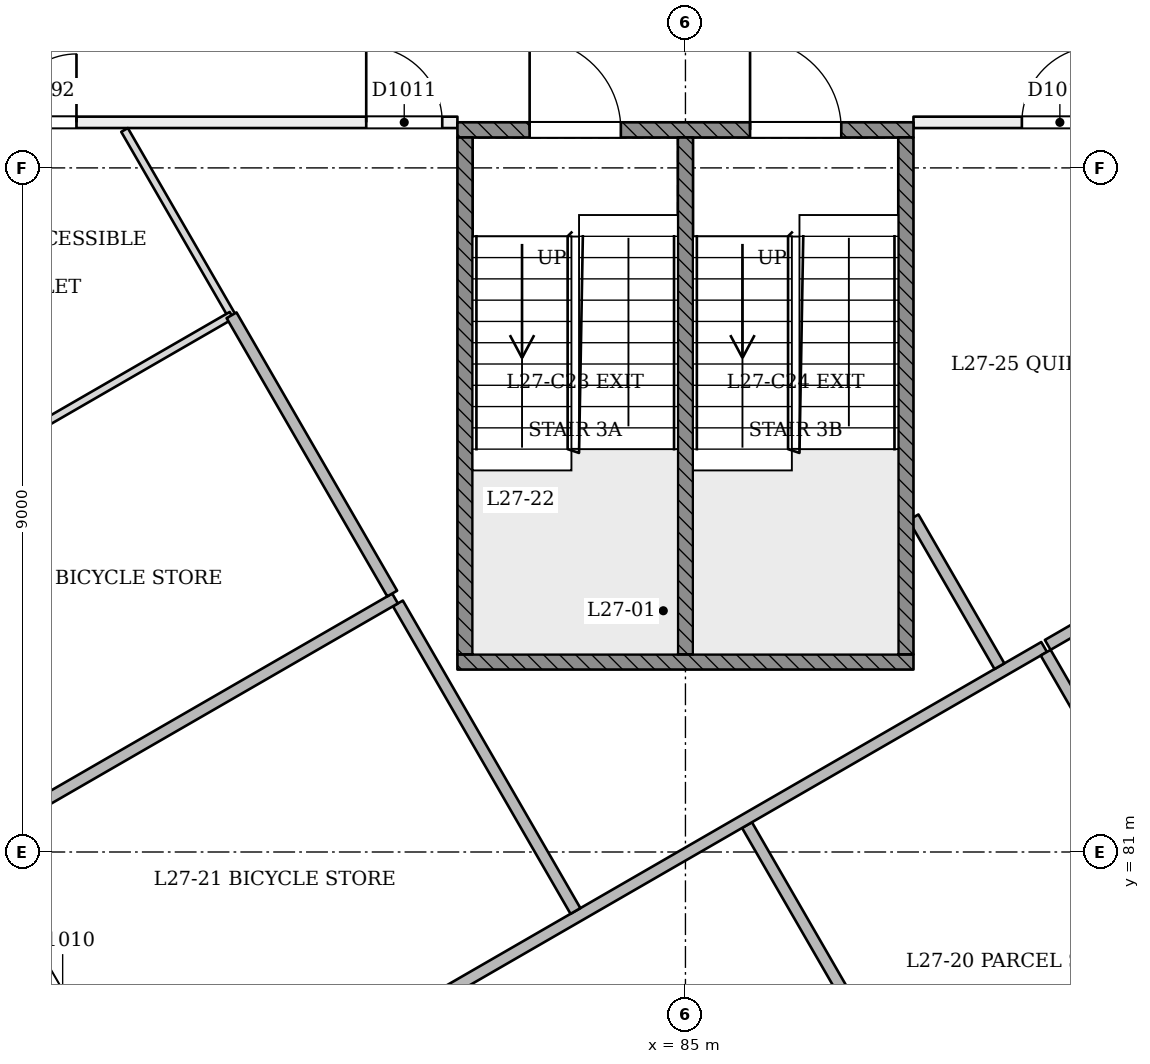
"""IFC4 building model, lengths in metres.
Left out: names, types, materials, properties, quantities, classifications, styles, units other than length and angle.
Written with IfcOpenShell. Run it as: python <this file> out.ifc"""

import sys

from ifc_helpers import new_model, si_unit, direction, frame, frame_2d, origin, place, context, subcontext, project, spatial, rectangle, extrude, element, fill, save


model = new_model("IFC4")
c1 = context("Model", 3, precision=1e-05, world=origin(), true_north=direction((0.0, 1.0)))
c2 = subcontext(c1, "Body", "Model", "MODEL_VIEW")
j1 = project(units=[si_unit("LENGTHUNIT", "METRE"), si_unit("PLANEANGLEUNIT", "RADIAN")], contexts=[c1])
p1 = place(None, origin())
s1 = spatial("IfcSite", under=j1, at=p1, CompositionType="ELEMENT")
p2 = place(p1, origin())
s2 = spatial("IfcBuilding", under=s1, at=p2, CompositionType="ELEMENT")
p3 = place(p2, frame((0.0, 0.0, 108.0)))
s3 = spatial("IfcBuildingStorey", under=s2, at=p3, CompositionType="ELEMENT", Elevation=108.0)
p4 = place(p3, frame((88.0, 90.599, 0.0), z_axis=(0.0, 0.0, 1.0), x_axis=(0.999999996544, 8.3141069e-05, 0.0)))
e1 = element("IfcWall", 1, at=p4, inside=s3, PredefinedType="PARTITIONING", context=c2, shape_type="SweptSolid", body=[
    extrude(rectangle(XDim=11.746, YDim=0.15, at=frame_2d((5.873, 0.0))), origin(), (0.0, 0.0, 1.0), 3.1),
])
p5 = place(p4, frame((4.807, 0.0, 0.0)))
e2 = element("IfcOpeningElement", 2, at=p5, cuts=e1, PredefinedType="OPENING", context=c2, shape_type="SweptSolid", body=[
    extrude(rectangle(XDim=1.0, YDim=2.1, at=frame_2d((0.5, 1.05))), frame((0.0, 0.085, 0.0), z_axis=(0.0, -1.0, 0.0), x_axis=(1.0, 0.0, 0.0)), (0.0, 0.0, 1.0), 0.171),
])
p6 = place(p4, frame((1.426, 0.0, 0.0)))
e3 = element("IfcOpeningElement", 3, at=p6, cuts=e1, PredefinedType="OPENING", context=c2, shape_type="SweptSolid", body=[
    extrude(rectangle(XDim=1.0, YDim=2.1, at=frame_2d((0.5, 1.05))), frame((0.0, 0.085, 0.0), z_axis=(0.0, -1.0, 0.0), x_axis=(1.0, 0.0, 0.0)), (0.0, 0.0, 1.0), 0.171),
])
p7 = place(p3, frame((99.876, 90.6, 0.0), z_axis=(0.0, 0.0, 1.0), x_axis=(-0.499999508355, -0.866025687636, 0.0)))
e4 = element("IfcWall", 4, at=p7, inside=s3, PredefinedType="PARTITIONING", context=c2, shape_type="SweptSolid", body=[
    extrude(rectangle(XDim=29.622, YDim=0.15, at=frame_2d((14.811, 0.0))), origin(), (0.0, 0.0, 1.0), 3.1),
])
p8 = place(p7, frame((0.888, 0.0, 0.0)))
e5 = element("IfcOpeningElement", 5, at=p8, cuts=e4, PredefinedType="OPENING", context=c2, shape_type="SweptSolid", body=[
    extrude(rectangle(XDim=0.9, YDim=2.1, at=frame_2d((0.45, 1.05))), frame((0.0, 0.085, 0.0), z_axis=(0.0, -1.0, 0.0), x_axis=(1.0, 0.0, 0.0)), (0.0, 0.0, 1.0), 0.171),
])
p9 = place(p7, frame((19.95, 0.0, 0.0)))
e6 = element("IfcOpeningElement", 6, at=p9, cuts=e4, PredefinedType="OPENING", context=c2, shape_type="SweptSolid", body=[
    extrude(rectangle(XDim=1.0, YDim=2.1, at=frame_2d((0.5, 1.05))), frame((0.0, 0.085, 0.0), z_axis=(0.0, -1.0, 0.0), x_axis=(1.0, 0.0, 0.0)), (0.0, 0.0, 1.0), 0.171),
])
p10 = place(p7, frame((14.284, 0.0, 0.0)))
e7 = element("IfcOpeningElement", 7, at=p10, cuts=e4, PredefinedType="OPENING", context=c2, shape_type="SweptSolid", body=[
    extrude(rectangle(XDim=1.0, YDim=2.1, at=frame_2d((0.5, 1.05))), frame((0.0, 0.085, 0.0), z_axis=(0.0, -1.0, 0.0), x_axis=(1.0, 0.0, 0.0)), (0.0, 0.0, 1.0), 0.171),
])
p11 = place(p7, frame((6.435, 0.0, 0.0)))
e8 = element("IfcOpeningElement", 8, at=p11, cuts=e4, PredefinedType="OPENING", context=c2, shape_type="SweptSolid", body=[
    extrude(rectangle(XDim=1.0, YDim=2.1, at=frame_2d((0.5, 1.05))), frame((0.0, 0.085, 0.0), z_axis=(0.0, -1.0, 0.0), x_axis=(1.0, 0.0, 0.0)), (0.0, 0.0, 1.0), 0.171),
])
p12 = place(p7, frame((10.748, 0.0, 0.0)))
e9 = element("IfcOpeningElement", 9, at=p12, cuts=e4, PredefinedType="OPENING", context=c2, shape_type="SweptSolid", body=[
    extrude(rectangle(XDim=1.0, YDim=2.1, at=frame_2d((0.5, 1.05))), frame((0.0, 0.085, 0.0), z_axis=(0.0, -1.0, 0.0), x_axis=(1.0, 0.0, 0.0)), (0.0, 0.0, 1.0), 0.171),
])
p13 = place(p3, frame((63.866, 97.84, 0.0), z_axis=(0.0, 0.0, 1.0), x_axis=(0.499996899578, -0.866027193807, 0.0)))
e10 = element("IfcWall", 10, at=p13, inside=s3, PredefinedType="PARTITIONING", context=c2, shape_type="SweptSolid", body=[
    extrude(rectangle(XDim=41.505, YDim=0.15, at=frame_2d((20.752, 0.0))), origin(), (0.0, 0.0, 1.0), 2.7),
])
p14 = place(p13, frame((2.792, 0.0, 0.0)))
e11 = element("IfcOpeningElement", 11, at=p14, cuts=e10, PredefinedType="OPENING", context=c2, shape_type="SweptSolid", body=[
    extrude(rectangle(XDim=1.2, YDim=2.1, at=frame_2d((0.6, 1.05))), frame((0.0, 0.085, 0.0), z_axis=(0.0, -1.0, 0.0), x_axis=(1.0, 0.0, 0.0)), (0.0, 0.0, 1.0), 0.171),
])
p15 = place(p13, frame((11.153, 0.0, 0.0)))
e12 = element("IfcOpeningElement", 12, at=p15, cuts=e10, PredefinedType="OPENING", context=c2, shape_type="SweptSolid", body=[
    extrude(rectangle(XDim=1.2, YDim=2.1, at=frame_2d((0.6, 1.05))), frame((0.0, 0.085, 0.0), z_axis=(0.0, -1.0, 0.0), x_axis=(1.0, 0.0, 0.0)), (0.0, 0.0, 1.0), 0.171),
])
p16 = place(p13, frame((22.403, 0.0, 0.0)))
e13 = element("IfcOpeningElement", 13, at=p16, cuts=e10, PredefinedType="OPENING", context=c2, shape_type="SweptSolid", body=[
    extrude(rectangle(XDim=1.2, YDim=2.1, at=frame_2d((0.6, 1.05))), frame((0.0, 0.085, 0.0), z_axis=(0.0, -1.0, 0.0), x_axis=(1.0, 0.0, 0.0)), (0.0, 0.0, 1.0), 0.171),
])
p17 = place(p13, frame((32.553, 0.0, 0.0)))
e14 = element("IfcOpeningElement", 14, at=p17, cuts=e10, PredefinedType="OPENING", context=c2, shape_type="SweptSolid", body=[
    extrude(rectangle(XDim=1.2, YDim=2.1, at=frame_2d((0.6, 1.05))), frame((0.0, 0.085, 0.0), z_axis=(0.0, -1.0, 0.0), x_axis=(1.0, 0.0, 0.0)), (0.0, 0.0, 1.0), 0.171),
])
p18 = place(p13, frame((39.864, 0.0, 0.0)))
e15 = element("IfcOpeningElement", 15, at=p18, cuts=e10, PredefinedType="OPENING", context=c2, shape_type="SweptSolid", body=[
    extrude(rectangle(XDim=1.0, YDim=2.1, at=frame_2d((0.5, 1.05))), frame((0.0, 0.085, 0.0), z_axis=(0.0, -1.0, 0.0), x_axis=(1.0, 0.0, 0.0)), (0.0, 0.0, 1.0), 0.171),
])
p19 = place(p3, frame((85.381, 61.895, 0.0), z_axis=(0.0, 0.0, 1.0), x_axis=(0.499996899578, 0.866027193807, 0.0)))
e16 = element("IfcWall", 16, at=p19, inside=s3, PredefinedType="PARTITIONING", context=c2, shape_type="SweptSolid", body=[
    extrude(rectangle(XDim=41.505, YDim=0.15, at=frame_2d((20.752, 0.0))), origin(), (0.0, 0.0, 1.0), 2.7),
])
p20 = place(p19, frame((0.226, 0.0, 0.0)))
e17 = element("IfcOpeningElement", 17, at=p20, cuts=e16, PredefinedType="OPENING", context=c2, shape_type="SweptSolid", body=[
    extrude(rectangle(XDim=1.2, YDim=2.1, at=frame_2d((0.6, 1.05))), frame((0.0, 0.085, 0.0), z_axis=(0.0, -1.0, 0.0), x_axis=(1.0, 0.0, 0.0)), (0.0, 0.0, 1.0), 0.171),
])
p21 = place(p19, frame((8.903, 0.0, 0.0)))
e18 = element("IfcOpeningElement", 18, at=p21, cuts=e16, PredefinedType="OPENING", context=c2, shape_type="SweptSolid", body=[
    extrude(rectangle(XDim=1.2, YDim=2.1, at=frame_2d((0.6, 1.05))), frame((0.0, 0.085, 0.0), z_axis=(0.0, -1.0, 0.0), x_axis=(1.0, 0.0, 0.0)), (0.0, 0.0, 1.0), 0.171),
])
p22 = place(p19, frame((22.403, 0.0, 0.0)))
e19 = element("IfcOpeningElement", 19, at=p22, cuts=e16, PredefinedType="OPENING", context=c2, shape_type="SweptSolid", body=[
    extrude(rectangle(XDim=1.2, YDim=2.1, at=frame_2d((0.6, 1.05))), frame((0.0, 0.085, 0.0), z_axis=(0.0, -1.0, 0.0), x_axis=(1.0, 0.0, 0.0)), (0.0, 0.0, 1.0), 0.171),
])
p23 = place(p19, frame((32.553, 0.0, 0.0)))
e20 = element("IfcOpeningElement", 20, at=p23, cuts=e16, PredefinedType="OPENING", context=c2, shape_type="SweptSolid", body=[
    extrude(rectangle(XDim=1.2, YDim=2.1, at=frame_2d((0.6, 1.05))), frame((0.0, 0.085, 0.0), z_axis=(0.0, -1.0, 0.0), x_axis=(1.0, 0.0, 0.0)), (0.0, 0.0, 1.0), 0.171),
])
p24 = place(p19, frame((40.024, 0.0, 0.0)))
e21 = element("IfcOpeningElement", 21, at=p24, cuts=e16, PredefinedType="OPENING", context=c2, shape_type="SweptSolid", body=[
    extrude(rectangle(XDim=1.2, YDim=2.1, at=frame_2d((0.6, 1.05))), frame((0.0, 0.085, 0.0), z_axis=(0.0, -1.0, 0.0), x_axis=(1.0, 0.0, 0.0)), (0.0, 0.0, 1.0), 0.171),
])
p25 = place(p3, frame((85.0, 64.834, 0.0), z_axis=(0.0, 0.0, 1.0), x_axis=(-0.499998535175, 0.8660262495, 0.0)))
e22 = element("IfcWall", 22, at=p25, inside=s3, PredefinedType="PARTITIONING", context=c2, shape_type="SweptSolid", body=[
    extrude(rectangle(XDim=29.751, YDim=0.15, at=frame_2d((14.876, 0.0))), origin(), (0.0, 0.0, 1.0), 3.1),
])
p26 = place(p25, frame((11.629, 0.0, 0.0)))
e23 = element("IfcOpeningElement", 23, at=p26, cuts=e22, PredefinedType="OPENING", context=c2, shape_type="SweptSolid", body=[
    extrude(rectangle(XDim=1.2, YDim=2.1, at=frame_2d((0.6, 1.05))), frame((0.0, 0.085, 0.0), z_axis=(0.0, -1.0, 0.0), x_axis=(1.0, 0.0, 0.0)), (0.0, 0.0, 1.0), 0.171),
])
p27 = place(p25, frame((8.136, 0.0, 0.0)))
e24 = element("IfcOpeningElement", 24, at=p27, cuts=e22, PredefinedType="OPENING", context=c2, shape_type="SweptSolid", body=[
    extrude(rectangle(XDim=1.2, YDim=2.1, at=frame_2d((0.6, 1.05))), frame((0.0, 0.085, 0.0), z_axis=(0.0, -1.0, 0.0), x_axis=(1.0, 0.0, 0.0)), (0.0, 0.0, 1.0), 0.171),
])
p28 = place(p25, frame((15.887, 0.0, 0.0)))
e25 = element("IfcOpeningElement", 25, at=p28, cuts=e22, PredefinedType="OPENING", context=c2, shape_type="SweptSolid", body=[
    extrude(rectangle(XDim=1.0, YDim=2.1, at=frame_2d((0.5, 1.05))), frame((0.0, 0.085, 0.0), z_axis=(0.0, -1.0, 0.0), x_axis=(1.0, 0.0, 0.0)), (0.0, 0.0, 1.0), 0.171),
])
p29 = place(p25, frame((3.673, 0.0, 0.0)))
e26 = element("IfcOpeningElement", 26, at=p29, cuts=e22, PredefinedType="OPENING", context=c2, shape_type="SweptSolid", body=[
    extrude(rectangle(XDim=1.0, YDim=2.1, at=frame_2d((0.5, 1.05))), frame((0.0, 0.085, 0.0), z_axis=(0.0, -1.0, 0.0), x_axis=(1.0, 0.0, 0.0)), (0.0, 0.0, 1.0), 0.171),
])
p30 = place(p25, frame((20.45, 0.0, 0.0)))
e27 = element("IfcOpeningElement", 27, at=p30, cuts=e22, PredefinedType="OPENING", context=c2, shape_type="SweptSolid", body=[
    extrude(rectangle(XDim=1.0, YDim=2.1, at=frame_2d((0.5, 1.05))), frame((0.0, 0.085, 0.0), z_axis=(0.0, -1.0, 0.0), x_axis=(1.0, 0.0, 0.0)), (0.0, 0.0, 1.0), 0.171),
])
p31 = place(p25, frame((25.486, 0.0, 0.0)))
e28 = element("IfcOpeningElement", 28, at=p31, cuts=e22, PredefinedType="OPENING", context=c2, shape_type="SweptSolid", body=[
    extrude(rectangle(XDim=1.0, YDim=2.1, at=frame_2d((0.5, 1.05))), frame((0.0, 0.085, 0.0), z_axis=(0.0, -1.0, 0.0), x_axis=(1.0, 0.0, 0.0)), (0.0, 0.0, 1.0), 0.171),
])
p32 = place(p3, frame((70.254, 90.6, 0.0), z_axis=(0.0, 0.0, 1.0), x_axis=(0.999999996544, -8.3141069e-05, 0.0)))
e29 = element("IfcWall", 29, at=p32, inside=s3, PredefinedType="PARTITIONING", context=c2, shape_type="SweptSolid", body=[
    extrude(rectangle(XDim=11.746, YDim=0.15, at=frame_2d((5.873, 0.0))), origin(), (0.0, 0.0, 1.0), 3.1),
])
p33 = place(p32, frame((5.834, 0.0, 0.0)))
e30 = element("IfcOpeningElement", 30, at=p33, cuts=e29, PredefinedType="OPENING", context=c2, shape_type="SweptSolid", body=[
    extrude(rectangle(XDim=0.9, YDim=2.1, at=frame_2d((0.45, 1.05))), frame((0.0, 0.085, 0.0), z_axis=(0.0, -1.0, 0.0), x_axis=(1.0, 0.0, 0.0)), (0.0, 0.0, 1.0), 0.171),
])
p34 = place(p32, frame((10.546, 0.0, 0.0)))
e31 = element("IfcOpeningElement", 31, at=p34, cuts=e29, PredefinedType="OPENING", context=c2, shape_type="SweptSolid", body=[
    extrude(rectangle(XDim=1.0, YDim=2.1, at=frame_2d((0.5, 1.05))), frame((0.0, 0.085, 0.0), z_axis=(0.0, -1.0, 0.0), x_axis=(1.0, 0.0, 0.0)), (0.0, 0.0, 1.0), 0.171),
])
p35 = place(p3, frame((79.038, 88.044, 0.0), z_axis=(0.0, 0.0, 1.0), x_axis=(-0.500000709865, 0.866024993943, 0.0)))
e32 = element("IfcWall", 32, at=p35, inside=s3, PredefinedType="PARTITIONING", context=c2, shape_type="SweptSolid", body=[
    extrude(rectangle(XDim=2.835, YDim=0.1, at=frame_2d((1.418, 0.0))), origin(), (0.0, 0.0, 1.0), 3.1),
])
p36 = place(p3, frame((76.222, 86.441, 0.0), z_axis=(0.0, 0.0, 1.0), x_axis=(0.866027491634, 0.499996383721, 0.0)))
e33 = element("IfcWall", 33, at=p36, inside=s3, PredefinedType="PARTITIONING", context=c2, shape_type="SweptSolid", body=[
    extrude(rectangle(XDim=3.24, YDim=0.1, at=frame_2d((1.62, 0.0))), origin(), (0.0, 0.0, 1.0), 3.1),
])
p37 = place(p3, frame((89.766, 83.725, 0.0), z_axis=(0.0, 0.0, 1.0), x_axis=(0.866020851292, 0.500007885066, 0.0)))
e34 = element("IfcWall", 34, at=p37, inside=s3, PredefinedType="PARTITIONING", context=c2, shape_type="SweptSolid", body=[
    extrude(rectangle(XDim=5.973, YDim=0.15, at=frame_2d((2.986, 0.0))), origin(), (0.0, 0.0, 1.0), 3.1),
])
p38 = place(p3, frame((89.229, 75.433, 0.0), z_axis=(0.0, 0.0, 1.0), x_axis=(-0.500014030929, 0.866017302872, 0.0)))
e35 = element("IfcWall", 35, at=p38, inside=s3, PredefinedType="PARTITIONING", context=c2, shape_type="SweptSolid", body=[
    extrude(rectangle(XDim=6.837, YDim=0.15, at=frame_2d((3.418, 0.0))), origin(), (0.0, 0.0, 1.0), 3.1),
])
p39 = place(p3, frame((89.719, 83.697, 0.0), z_axis=(0.0, 0.0, 1.0), x_axis=(-0.866020451134, -0.500008578143, 0.0)))
e36 = element("IfcWall", 36, at=p39, inside=s3, PredefinedType="PARTITIONING", context=c2, shape_type="SweptSolid", body=[
    extrude(rectangle(XDim=13.443, YDim=0.15, at=frame_2d((6.721, 0.0))), origin(), (0.0, 0.0, 1.0), 3.1),
])
p40 = place(p3, frame((92.728, 78.445, 0.0), z_axis=(0.0, 0.0, 1.0), x_axis=(-0.500004068591, 0.86602305477, 0.0)))
e37 = element("IfcWall", 37, at=p40, inside=s3, PredefinedType="PARTITIONING", context=c2, shape_type="SweptSolid", body=[
    extrude(rectangle(XDim=5.979, YDim=0.15, at=frame_2d((2.989, 0.0))), origin(), (0.0, 0.0, 1.0), 3.1),
])
p41 = place(p3, frame((83.553, 80.224, 0.0), z_axis=(0.0, 0.0, 1.0), x_axis=(-0.499999868264, 0.866025479842, 0.0)))
e38 = element("IfcWall", 38, at=p41, inside=s3, PredefinedType="PARTITIONING", context=c2, shape_type="SweptSolid", body=[
    extrude(rectangle(XDim=4.672, YDim=0.15, at=frame_2d((2.336, 0.0))), origin(), (0.0, 0.0, 1.0), 3.1),
])
p42 = place(p3, frame((81.179, 84.335, 0.0), z_axis=(0.0, 0.0, 1.0), x_axis=(-0.866023385972, -0.500003494938, 0.0)))
e39 = element("IfcWall", 39, at=p42, inside=s3, PredefinedType="PARTITIONING", context=c2, shape_type="SweptSolid", body=[
    extrude(rectangle(XDim=6.367, YDim=0.15, at=frame_2d((3.183, 0.0))), origin(), (0.0, 0.0, 1.0), 3.1),
])
p43 = place(p3, frame((79.028, 88.061, 0.0), z_axis=(0.0, 0.0, 1.0), x_axis=(0.500009099585, -0.866020150073, 0.0)))
e40 = element("IfcWall", 40, at=p43, inside=s3, PredefinedType="PARTITIONING", context=c2, shape_type="SweptSolid", body=[
    extrude(rectangle(XDim=4.227, YDim=0.15, at=frame_2d((2.114, 0.0))), origin(), (0.0, 0.0, 1.0), 3.1),
])
p44 = place(p3, frame((89.131, 83.444, 0.0), z_axis=(0.0, 0.0, 1.0), x_axis=(-0.500040169509, 0.866002210665, 0.0)))
e41 = element("IfcWall", 41, at=p44, inside=s3, PredefinedType="PARTITIONING", context=c2, shape_type="SweptSolid", body=[
    extrude(rectangle(XDim=2.261, YDim=0.15, at=frame_2d((1.131, 0.0))), origin(), (0.0, 0.0, 1.0), 3.1),
])
p45 = place(p3, frame((82.0, 90.5, 0.0), z_axis=(0.0, 0.0, 1.0), x_axis=(1.0, 0.0, 0.0)))
e42 = element("IfcWall", 42, at=p45, inside=s3, PredefinedType="SOLIDWALL", context=c2, shape_type="SweptSolid", body=[
    extrude(rectangle(XDim=6.0, YDim=0.2, at=frame_2d((3.0, 0.0))), origin(), (0.0, 0.0, 1.0), 3.1),
])
p46 = place(p45, frame((0.95, 0.0, 0.0)))
e43 = element("IfcOpeningElement", 43, at=p46, cuts=e42, PredefinedType="OPENING", context=c2, shape_type="SweptSolid", body=[
    extrude(rectangle(XDim=1.2, YDim=2.1, at=frame_2d((0.6, 1.05))), frame((0.0, 0.11, 0.0), z_axis=(0.0, -1.0, 0.0), x_axis=(1.0, 0.0, 0.0)), (0.0, 0.0, 1.0), 0.221),
])
p47 = place(p45, frame((3.85, 0.0, 0.0)))
e44 = element("IfcOpeningElement", 44, at=p47, cuts=e42, PredefinedType="OPENING", context=c2, shape_type="SweptSolid", body=[
    extrude(rectangle(XDim=1.2, YDim=2.1, at=frame_2d((0.6, 1.05))), frame((0.0, 0.11, 0.0), z_axis=(0.0, -1.0, 0.0), x_axis=(1.0, 0.0, 0.0)), (0.0, 0.0, 1.0), 0.221),
])
p48 = place(p3, frame((82.0, 83.5, 0.0), z_axis=(0.0, 0.0, 1.0), x_axis=(1.0, 0.0, 0.0)))
e45 = element("IfcWall", 45, at=p48, inside=s3, PredefinedType="SOLIDWALL", context=c2, shape_type="SweptSolid", body=[
    extrude(rectangle(XDim=6.0, YDim=0.2, at=frame_2d((3.0, 0.0))), origin(), (0.0, 0.0, 1.0), 3.1),
])
for number, where, z_axis, x_axis in (
    (46, (82.1, 83.6, 0.0), (0.0, 0.0, 1.0), (0.0, 1.0, 0.0)),
    (47, (87.9, 83.6, 0.0), (0.0, 0.0, 1.0), (0.0, 1.0, 0.0)),
    (48, (85.0, 83.6, 0.0), (0.0, 0.0, 1.0), (0.0, 1.0, 0.0)),
):
    element("IfcWall", number, at=place(p3, frame(where, z_axis=z_axis, x_axis=x_axis)), inside=s3, PredefinedType="SOLIDWALL", context=c2, shape_type="SweptSolid", body=[
        extrude(rectangle(XDim=6.8, YDim=0.2, at=frame_2d((3.4, 0.0))), origin(), (0.0, 0.0, 1.0), 3.1),
    ])
p49 = place(p33, origin())
e49 = element("IfcDoor", 49, at=p49, inside=s3, OperationType="SINGLE_SWING_RIGHT", PredefinedType="NOTDEFINED", context=c2, shape_type="SweptSolid", body=[
    extrude(rectangle(XDim=0.9, YDim=2.1, at=frame_2d((0.45, 1.05))), frame((0.0, 0.025, 0.0), z_axis=(0.0, -1.0, 0.0), x_axis=(1.0, 0.0, 0.0)), (0.0, 0.0, 1.0), 0.05),
])
fill(e30, e49)
p50 = place(p28, origin())
e50 = element("IfcDoor", 50, at=p50, inside=s3, OperationType="SINGLE_SWING_LEFT", PredefinedType="NOTDEFINED", context=c2, shape_type="SweptSolid", body=[
    extrude(rectangle(XDim=1.0, YDim=2.1, at=frame_2d((0.5, 1.05))), frame((0.0, 0.025, 0.0), z_axis=(0.0, -1.0, 0.0), x_axis=(1.0, 0.0, 0.0)), (0.0, 0.0, 1.0), 0.05),
])
fill(e25, e50)
p51 = place(p34, origin())
e51 = element("IfcDoor", 51, at=p51, inside=s3, OperationType="SINGLE_SWING_LEFT", PredefinedType="NOTDEFINED", context=c2, shape_type="SweptSolid", body=[
    extrude(rectangle(XDim=1.0, YDim=2.1, at=frame_2d((0.5, 1.05))), frame((0.0, 0.025, 0.0), z_axis=(0.0, -1.0, 0.0), x_axis=(1.0, 0.0, 0.0)), (0.0, 0.0, 1.0), 0.05),
])
fill(e31, e51)
p52 = place(p6, origin())
e52 = element("IfcDoor", 52, at=p52, inside=s3, OperationType="SINGLE_SWING_RIGHT", PredefinedType="NOTDEFINED", context=c2, shape_type="SweptSolid", body=[
    extrude(rectangle(XDim=1.0, YDim=2.1, at=frame_2d((0.5, 1.05))), frame((0.0, 0.025, 0.0), z_axis=(0.0, -1.0, 0.0), x_axis=(1.0, 0.0, 0.0)), (0.0, 0.0, 1.0), 0.05),
])
fill(e3, e52)
p53 = place(p46, origin())
e53 = element("IfcDoor", 53, at=p53, inside=s3, OperationType="SINGLE_SWING_LEFT", PredefinedType="NOTDEFINED", context=c2, shape_type="SweptSolid", body=[
    extrude(rectangle(XDim=1.2, YDim=2.1, at=frame_2d((0.6, 1.05))), frame((0.0, 0.025, 0.0), z_axis=(0.0, -1.0, 0.0), x_axis=(1.0, 0.0, 0.0)), (0.0, 0.0, 1.0), 0.05),
])
fill(e43, e53)
p54 = place(p47, origin())
e54 = element("IfcDoor", 54, at=p54, inside=s3, OperationType="SINGLE_SWING_LEFT", PredefinedType="NOTDEFINED", context=c2, shape_type="SweptSolid", body=[
    extrude(rectangle(XDim=1.2, YDim=2.1, at=frame_2d((0.6, 1.05))), frame((0.0, 0.025, 0.0), z_axis=(0.0, -1.0, 0.0), x_axis=(1.0, 0.0, 0.0)), (0.0, 0.0, 1.0), 0.05),
])
fill(e44, e54)
save(model, sys.argv[1])
